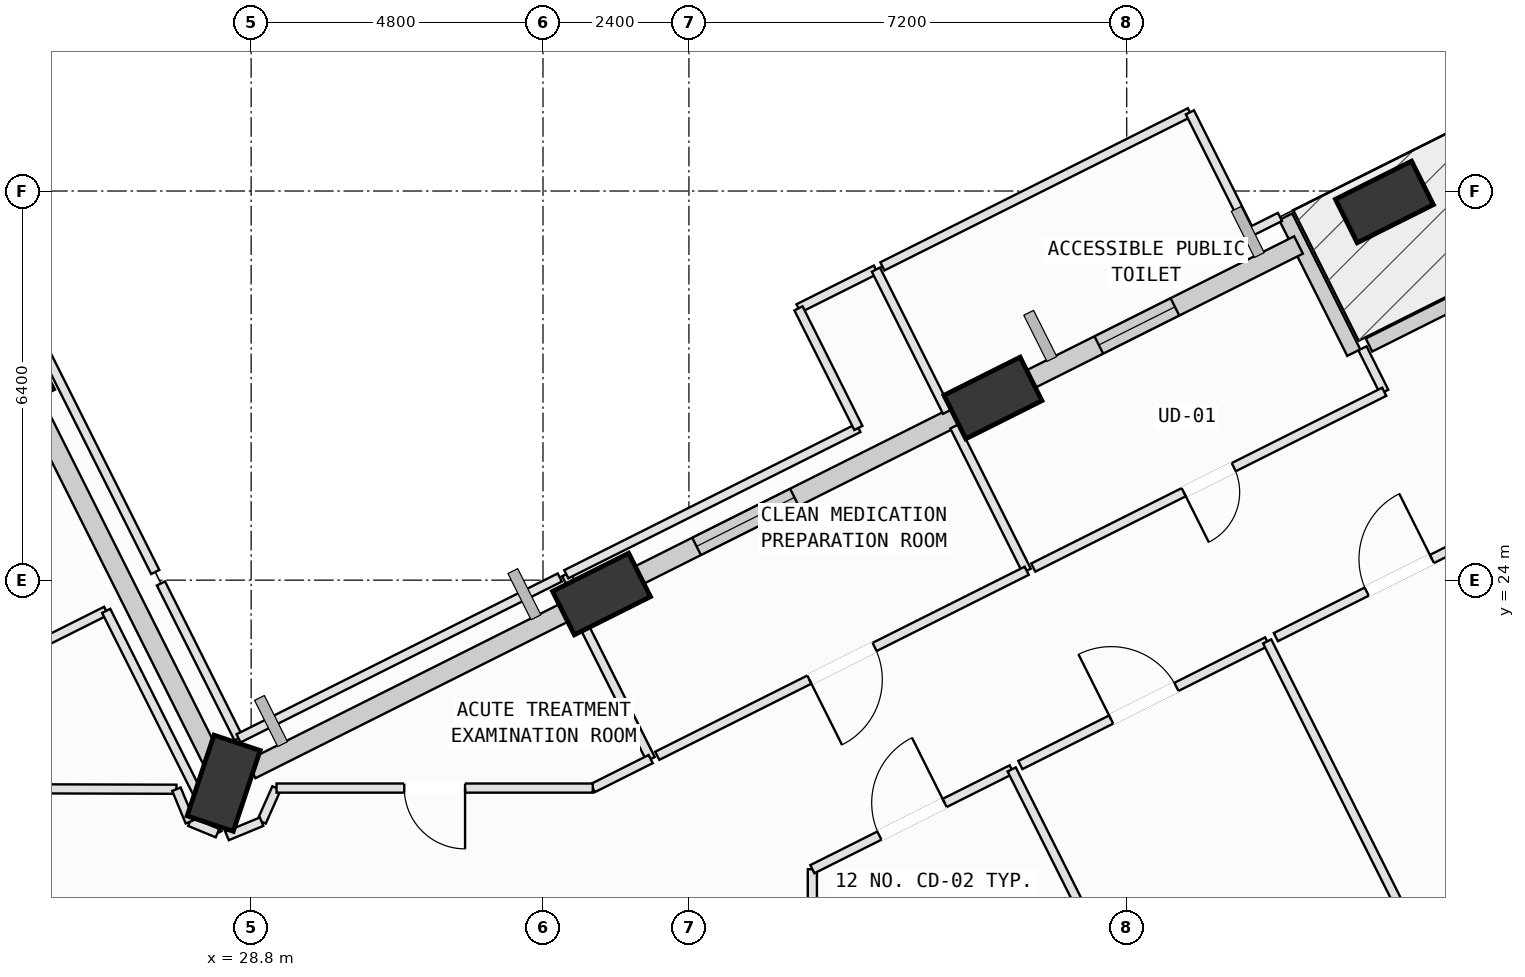
"""IFC4 building model, lengths in metres.
Left out: names, types, materials, properties, quantities, classifications, styles, units other than length and angle.
Written with IfcOpenShell. Run it as: python <this file> out.ifc"""

import sys

from ifc_helpers import new_model, si_unit, direction, frame, frame_2d, origin, origin_2d, place, context, subcontext, project, spatial, rectangle, extrude, element, fill, save


model = new_model("IFC4")
c1 = context("Model", 3, precision=1e-05, world=origin(), true_north=direction((0.0, 1.0)))
c2 = subcontext(c1, "Body", "Model", "MODEL_VIEW")
j1 = project(units=[si_unit("LENGTHUNIT", "METRE"), si_unit("PLANEANGLEUNIT", "RADIAN")], contexts=[c1])
p1 = place(None, origin())
s1 = spatial("IfcSite", under=j1, at=p1, CompositionType="ELEMENT")
p2 = place(p1, origin())
s2 = spatial("IfcBuilding", under=s1, at=p2, CompositionType="ELEMENT")
p3 = place(p2, frame((0.0, 0.0, 136.4)))
s3 = spatial("IfcBuildingStorey", under=s2, at=p3, CompositionType="ELEMENT", Elevation=136.4)
p4 = place(p3, frame((47.438, 30.22, 0.002), z_axis=(-0.022926759668, 0.057072997472, 0.998106726082), x_axis=(-0.663121749052, -0.748004750264, 0.027539780598)))
e1 = element("IfcColumn", 1, at=p4, inside=s3, PredefinedType="COLUMN", context=c2, shape_type="SweptSolid", body=[
    extrude(rectangle(XDim=1.4, YDim=0.8, at=origin_2d()), origin(), (0.0, 0.0, 1.0), 4.004),
])
p5 = place(p3, frame((41.0, 26.996, 0.002), z_axis=(-0.00934215371, 0.030590973914, 0.999488327335), x_axis=(-0.724454110909, -0.689174234147, 0.014321877472)))
e2 = element("IfcColumn", 2, at=p5, inside=s3, PredefinedType="COLUMN", context=c2, shape_type="SweptSolid", body=[
    extrude(rectangle(XDim=1.4, YDim=0.8, at=origin_2d()), origin(), (0.0, 0.0, 1.0), 3.998),
])
p6 = place(p3, frame((34.562, 23.772, 0.002), z_axis=(0.004215213278, 0.004031943135, 0.999982987561), x_axis=(-0.941623611576, 0.336657322205, 0.002611805604)))
e3 = element("IfcColumn", 3, at=p6, inside=s3, PredefinedType="COLUMN", context=c2, shape_type="SweptSolid", body=[
    extrude(rectangle(XDim=1.4, YDim=0.8, at=origin_2d()), origin(), (0.0, 0.0, 1.0), 3.996),
])
p7 = place(p3, frame((28.348, 20.66, 0.002), z_axis=(0.017282154619, -0.021617960194, 0.99961692209), x_axis=(-0.345727391393, 0.93796742084, 0.026261916961)))
e4 = element("IfcColumn", 4, at=p7, inside=s3, PredefinedType="COLUMN", context=c2, shape_type="SweptSolid", body=[
    extrude(rectangle(XDim=1.4, YDim=0.8, at=origin_2d()), origin(), (0.0, 0.0, 1.0), 3.998),
])
p8 = place(p3, frame((47.185, 27.867, 0.0), z_axis=(0.0, 0.0, 1.0), x_axis=(0.894146388343, 0.447774760581, 0.0)))
e5 = element("IfcWall", 5, at=p8, inside=s3, PredefinedType="SOLIDWALL", context=c2, shape_type="SweptSolid", body=[
    extrude(rectangle(XDim=6.96, YDim=0.24, at=frame_2d((3.48, 0.0))), origin(), (0.0, 0.0, 1.0), 2.945),
])
p9 = place(p8, frame((2.93, 0.0, 0.0)))
e6 = element("IfcOpeningElement", 6, at=p9, cuts=e5, PredefinedType="OPENING", context=c2, shape_type="SweptSolid", body=[
    extrude(rectangle(XDim=1.1, YDim=2.15, at=frame_2d((0.55, 1.075))), frame((0.0, 0.13, 0.0), z_axis=(0.0, -1.0, 0.0), x_axis=(1.0, 0.0, 0.0)), (0.0, 0.0, 1.0), 0.26),
])
p10 = place(p3, frame((45.815, 29.977, 0.0), z_axis=(0.0, 0.0, 1.0), x_axis=(0.447760394829, -0.894153582346, 0.0)))
e7 = element("IfcWall", 7, at=p10, inside=s3, PredefinedType="SOLIDWALL", context=c2, shape_type="SweptSolid", body=[
    extrude(rectangle(XDim=2.5, YDim=0.24, at=frame_2d((1.25, 0.0))), origin(), (0.0, 0.0, 1.0), 3.165),
])
p11 = place(p3, frame((41.45, 27.221, 0.0), z_axis=(0.0, 0.0, 1.0), x_axis=(0.894150296452, 0.447766956523, 0.0)))
e8 = element("IfcWall", 8, at=p11, inside=s3, PredefinedType="SOLIDWALL", context=c2, shape_type="SweptSolid", body=[
    extrude(rectangle(XDim=5.117, YDim=0.32, at=frame_2d((2.559, 0.0))), origin(), (0.0, 0.0, 1.0), 3.145),
])
p12 = place(p11, frame((1.445, 0.0, 0.75)))
e9 = element("IfcOpeningElement", 9, at=p12, cuts=e8, PredefinedType="OPENING", context=c2, shape_type="SweptSolid", body=[
    extrude(rectangle(XDim=1.4, YDim=1.85, at=frame_2d((0.7, 0.925))), frame((0.0, 0.17, 0.0), z_axis=(0.0, -1.0, 0.0), x_axis=(1.0, 0.0, 0.0)), (0.0, 0.0, 1.0), 0.34),
])
p13 = place(p3, frame((35.016, 23.999, 0.0), z_axis=(0.0, 0.0, 1.0), x_axis=(0.89415974242, 0.447748093279, 0.0)))
e10 = element("IfcWall", 10, at=p13, inside=s3, PredefinedType="SOLIDWALL", context=c2, shape_type="SweptSolid", body=[
    extrude(rectangle(XDim=6.211, YDim=0.32, at=frame_2d((3.105, 0.0))), origin(), (0.0, 0.0, 1.0), 3.165),
])
p14 = place(p13, frame((1.241, 0.0, 0.75)))
e11 = element("IfcOpeningElement", 11, at=p14, cuts=e10, PredefinedType="OPENING", context=c2, shape_type="SweptSolid", body=[
    extrude(rectangle(XDim=1.8, YDim=2.05, at=frame_2d((0.9, 1.025))), frame((0.0, 0.17, 0.0), z_axis=(0.0, -1.0, 0.0), x_axis=(1.0, 0.0, 0.0)), (0.0, 0.0, 1.0), 0.34),
])
p15 = place(p3, frame((28.799, 20.886, 0.0), z_axis=(0.0, 0.0, 1.0), x_axis=(0.894148466578, 0.447770610599, 0.0)))
e12 = element("IfcWall", 12, at=p15, inside=s3, PredefinedType="SOLIDWALL", context=c2, shape_type="SweptSolid", body=[
    extrude(rectangle(XDim=5.96, YDim=0.32, at=frame_2d((2.98, 0.0))), origin(), (0.0, 0.0, 1.0), 2.965),
])
p16 = place(p3, frame((25.123, 27.1, 0.0), z_axis=(0.0, 0.0, 1.0), x_axis=(0.447762469935, -0.894152543204, 0.0)))
e13 = element("IfcWall", 13, at=p16, inside=s3, PredefinedType="SOLIDWALL", context=c2, shape_type="SweptSolid", body=[
    extrude(rectangle(XDim=6.76, YDim=0.32, at=frame_2d((3.38, 0.0))), origin(), (0.0, 0.0, 1.0), 3.165),
])
p17 = place(p3, frame((38.03, 17.215, 0.0), z_axis=(0.0, 0.0, 1.0), x_axis=(0.0, 1.0, 0.0)))
e14 = element("IfcWall", 14, at=p17, inside=s3, PredefinedType="PARTITIONING", context=c2, shape_type="SweptSolid", body=[
    extrude(rectangle(XDim=2.031, YDim=0.15, at=frame_2d((1.016, 0.0))), origin(), (0.0, 0.0, 1.0), 3.78),
])
p18 = place(p3, frame((38.03, 19.246, 0.0), z_axis=(0.0, 0.0, 1.0), x_axis=(0.894227304173, 0.447613146, 0.0)))
e15 = element("IfcWall", 15, at=p18, inside=s3, PredefinedType="PARTITIONING", context=c2, shape_type="SweptSolid", body=[
    extrude(rectangle(XDim=3.666, YDim=0.15, at=frame_2d((1.833, 0.0))), origin(), (0.0, 0.0, 1.0), 2.945),
])
p19 = place(p18, frame((1.233, 0.0, 0.0)))
e16 = element("IfcOpeningElement", 16, at=p19, cuts=e15, PredefinedType="OPENING", context=c2, shape_type="SweptSolid", body=[
    extrude(rectangle(XDim=1.2, YDim=2.15, at=frame_2d((0.6, 1.075))), frame((0.0, 0.085, 0.0), z_axis=(0.0, -1.0, 0.0), x_axis=(1.0, 0.0, 0.0)), (0.0, 0.0, 1.0), 0.17),
])
p20 = place(p3, frame((41.308, 20.887, 0.0), z_axis=(0.0, 0.0, 1.0), x_axis=(0.447793043956, -0.894137232076, 0.0)))
e17 = element("IfcWall", 17, at=p20, inside=s3, PredefinedType="PARTITIONING", context=c2, shape_type="SweptSolid", body=[
    extrude(rectangle(XDim=15.166, YDim=0.15, at=frame_2d((7.583, 0.0))), origin(), (0.0, 0.0, 1.0), 3.78),
])
p21 = place(p3, frame((41.451, 20.959, 0.0), z_axis=(0.0, 0.0, 1.0), x_axis=(0.894125827082, 0.447815816319, 0.0)))
e18 = element("IfcWall", 18, at=p21, inside=s3, PredefinedType="PARTITIONING", context=c2, shape_type="SweptSolid", body=[
    extrude(rectangle(XDim=4.54, YDim=0.15, at=frame_2d((2.27, 0.0))), origin(), (0.0, 0.0, 1.0), 3.78),
])
p22 = place(p21, frame((1.67, 0.0, 0.0)))
e19 = element("IfcOpeningElement", 19, at=p22, cuts=e18, PredefinedType="OPENING", context=c2, shape_type="SweptSolid", body=[
    extrude(rectangle(XDim=1.2, YDim=2.15, at=frame_2d((0.6, 1.075))), frame((0.0, 0.085, 0.0), z_axis=(0.0, -1.0, 0.0), x_axis=(1.0, 0.0, 0.0)), (0.0, 0.0, 1.0), 0.17),
])
p23 = place(p3, frame((45.51, 22.992, 0.0), z_axis=(0.0, 0.0, 1.0), x_axis=(0.447741560251, -0.894163013787, 0.0)))
e20 = element("IfcWall", 20, at=p23, inside=s3, PredefinedType="PARTITIONING", context=c2, shape_type="SweptSolid", body=[
    extrude(rectangle(XDim=15.165, YDim=0.15, at=frame_2d((7.583, 0.0))), origin(), (0.0, 0.0, 1.0), 3.365),
])
p24 = place(p3, frame((45.653, 23.063, 0.0), z_axis=(0.0, 0.0, 1.0), x_axis=(0.894158174305, 0.447751224815, 0.0)))
e21 = element("IfcWall", 21, at=p24, inside=s3, PredefinedType="PARTITIONING", context=c2, shape_type="SweptSolid", body=[
    extrude(rectangle(XDim=4.54, YDim=0.15, at=frame_2d((2.27, 0.0))), origin(), (0.0, 0.0, 1.0), 3.78),
])
p25 = place(p24, frame((1.67, 0.0, 0.0)))
e22 = element("IfcOpeningElement", 22, at=p25, cuts=e21, PredefinedType="OPENING", context=c2, shape_type="SweptSolid", body=[
    extrude(rectangle(XDim=1.2, YDim=2.15, at=frame_2d((0.6, 1.075))), frame((0.0, 0.085, 0.0), z_axis=(0.0, -1.0, 0.0), x_axis=(1.0, 0.0, 0.0)), (0.0, 0.0, 1.0), 0.17),
])
p26 = place(p3, frame((27.572, 20.561, 0.0), z_axis=(0.0, 0.0, 1.0), x_axis=(-0.999996180723, 0.002763790734, 0.0)))
e23 = element("IfcWall", 23, at=p26, inside=s3, PredefinedType="PARTITIONING", context=c2, shape_type="SweptSolid", body=[
    extrude(rectangle(XDim=6.89, YDim=0.15, at=frame_2d((3.445, 0.0))), origin(), (0.0, 0.0, 1.0), 3.78),
])
p27 = place(p26, frame((2.945, 0.0, 0.0)))
e24 = element("IfcOpeningElement", 24, at=p27, cuts=e23, PredefinedType="OPENING", context=c2, shape_type="SweptSolid", body=[
    extrude(rectangle(XDim=1.0, YDim=2.12, at=frame_2d((0.5, 1.06))), frame((0.0, 0.085, 0.0), z_axis=(0.0, -1.0, 0.0), x_axis=(1.0, 0.0, 0.0)), (0.0, 0.0, 1.0), 0.17),
])
p28 = place(p3, frame((20.665, 20.615, 0.0), z_axis=(0.0, 0.0, 1.0), x_axis=(0.894138524152, 0.447790463976, 0.0)))
e25 = element("IfcWall", 25, at=p28, inside=s3, PredefinedType="PARTITIONING", context=c2, shape_type="SweptSolid", body=[
    extrude(rectangle(XDim=6.432, YDim=0.15, at=frame_2d((3.216, 0.0))), origin(), (0.0, 0.0, 1.0), 3.78),
])
p29 = place(p3, frame((26.416, 23.495, 0.0), z_axis=(0.0, 0.0, 1.0), x_axis=(0.447810576622, -0.894128451323, 0.0)))
e26 = element("IfcWall", 26, at=p29, inside=s3, PredefinedType="PARTITIONING", context=c2, shape_type="SweptSolid", body=[
    extrude(rectangle(XDim=4.089, YDim=0.15, at=frame_2d((2.044, 0.0))), origin(), (0.0, 0.0, 1.0), 3.165),
])
p30 = place(p3, frame((28.247, 19.839, 0.0), z_axis=(0.0, 0.0, 1.0), x_axis=(-0.923956302996, 0.382498039412, 0.0)))
e27 = element("IfcWall", 27, at=p30, inside=s3, PredefinedType="PARTITIONING", context=c2, shape_type="SweptSolid", body=[
    extrude(rectangle(XDim=0.491, YDim=0.15, at=frame_2d((0.246, 0.0))), origin(), (0.0, 0.0, 1.0), 3.78),
])
p31 = place(p3, frame((27.793, 20.027, 0.0), z_axis=(0.0, 0.0, 1.0), x_axis=(-0.382364231834, 0.924011685107, 0.0)))
e28 = element("IfcWall", 28, at=p31, inside=s3, PredefinedType="PARTITIONING", context=c2, shape_type="SweptSolid", body=[
    extrude(rectangle(XDim=0.578, YDim=0.15, at=frame_2d((0.289, 0.0))), origin(), (0.0, 0.0, 1.0), 3.78),
])
p32 = place(p3, frame((29.218, 20.58, 0.0), z_axis=(0.0, 0.0, 1.0), x_axis=(-0.406587519567, -0.913611837123, 0.0)))
e29 = element("IfcWall", 29, at=p32, inside=s3, PredefinedType="PARTITIONING", context=c2, shape_type="SweptSolid", body=[
    extrude(rectangle(XDim=0.605, YDim=0.15, at=frame_2d((0.303, 0.0))), origin(), (0.0, 0.0, 1.0), 3.78),
])
p33 = place(p3, frame((28.972, 20.027, 0.0), z_axis=(0.0, 0.0, 1.0), x_axis=(-0.923944226518, -0.382527209861, 0.0)))
e30 = element("IfcWall", 30, at=p33, inside=s3, PredefinedType="PARTITIONING", context=c2, shape_type="SweptSolid", body=[
    extrude(rectangle(XDim=0.615, YDim=0.15, at=frame_2d((0.307, 0.0))), origin(), (0.0, 0.0, 1.0), 3.78),
])
p34 = place(p3, frame((27.317, 23.946, 0.0), z_axis=(0.0, 0.0, 1.0), x_axis=(0.447796055297, -0.894135723959, 0.0)))
e31 = element("IfcWall", 31, at=p34, inside=s3, PredefinedType="PARTITIONING", context=c2, shape_type="SweptSolid", body=[
    extrude(rectangle(XDim=2.85, YDim=0.15, at=frame_2d((1.425, 0.0))), origin(), (0.0, 0.0, 1.0), 3.78),
])
p35 = place(p3, frame((28.593, 21.398, 0.0), z_axis=(0.0, 0.0, 1.0), x_axis=(0.894187389423, 0.447692877536, 0.0)))
e32 = element("IfcWall", 32, at=p35, inside=s3, PredefinedType="PARTITIONING", context=c2, shape_type="SweptSolid", body=[
    extrude(rectangle(XDim=5.908, YDim=0.15, at=frame_2d((2.954, 0.0))), origin(), (0.0, 0.0, 1.0), 3.78),
])
p36 = place(p3, frame((34.182, 23.431, 0.0), z_axis=(0.0, 0.0, 1.0), x_axis=(0.447875493848, -0.894095935574, 0.0)))
e33 = element("IfcWall", 33, at=p36, inside=s3, PredefinedType="PARTITIONING", context=c2, shape_type="SweptSolid", body=[
    extrude(rectangle(XDim=2.655, YDim=0.15, at=frame_2d((1.328, 0.0))), origin(), (0.0, 0.0, 1.0), 2.965),
])
p37 = place(p3, frame((35.371, 21.057, 0.0), z_axis=(0.0, 0.0, 1.0), x_axis=(-0.894151898084, -0.447763758194, 0.0)))
e34 = element("IfcWall", 34, at=p37, inside=s3, PredefinedType="PARTITIONING", context=c2, shape_type="SweptSolid", body=[
    extrude(rectangle(XDim=1.065, YDim=0.15, at=frame_2d((0.532, 0.0))), origin(), (0.0, 0.0, 1.0), 3.365),
])
p38 = place(p3, frame((34.419, 20.58, 0.0), z_axis=(0.0, 0.0, 1.0), x_axis=(-1.0, 0.0, 0.0)))
e35 = element("IfcWall", 35, at=p38, inside=s3, PredefinedType="PARTITIONING", context=c2, shape_type="SweptSolid", body=[
    extrude(rectangle(XDim=5.201, YDim=0.15, at=frame_2d((2.601, 0.0))), origin(), (0.0, 0.0, 1.0), 3.365),
])
p39 = place(p38, frame((2.101, 0.0, 0.0)))
e36 = element("IfcOpeningElement", 36, at=p39, cuts=e35, PredefinedType="OPENING", context=c2, shape_type="SweptSolid", body=[
    extrude(rectangle(XDim=1.0, YDim=2.12, at=frame_2d((0.5, 1.06))), frame((0.0, 0.085, 0.0), z_axis=(0.0, -1.0, 0.0), x_axis=(1.0, 0.0, 0.0)), (0.0, 0.0, 1.0), 0.17),
])
p40 = place(p3, frame((37.802, 28.47, 0.0), z_axis=(0.0, 0.0, 1.0), x_axis=(0.894289935255, 0.447488001741, 0.0)))
e37 = element("IfcWall", 37, at=p40, inside=s3, PredefinedType="PARTITIONING", context=c2, shape_type="SweptSolid", body=[
    extrude(rectangle(XDim=1.423, YDim=0.15, at=frame_2d((0.712, 0.0))), origin(), (0.0, 0.0, 1.0), 3.78),
])
p41 = place(p3, frame((39.075, 29.107, 0.0), z_axis=(0.0, 0.0, 1.0), x_axis=(0.447885717917, -0.894090814004, 0.0)))
e38 = element("IfcWall", 38, at=p41, inside=s3, PredefinedType="PARTITIONING", context=c2, shape_type="SweptSolid", body=[
    extrude(rectangle(XDim=2.615, YDim=0.15, at=frame_2d((1.307, 0.0))), origin(), (0.0, 0.0, 1.0), 3.78),
])
p42 = place(p3, frame((40.366, 26.528, 0.0), z_axis=(0.0, 0.0, 1.0), x_axis=(0.447801985911, -0.894132753798, 0.0)))
e39 = element("IfcWall", 39, at=p42, inside=s3, PredefinedType="PARTITIONING", context=c2, shape_type="SweptSolid", body=[
    extrude(rectangle(XDim=2.655, YDim=0.15, at=frame_2d((1.328, 0.0))), origin(), (0.0, 0.0, 1.0), 3.78),
])
p43 = place(p3, frame((41.555, 24.154, 0.0), z_axis=(0.0, 0.0, 1.0), x_axis=(-0.894132389876, -0.447802712558, 0.0)))
e40 = element("IfcWall", 40, at=p43, inside=s3, PredefinedType="PARTITIONING", context=c2, shape_type="SweptSolid", body=[
    extrude(rectangle(XDim=6.795, YDim=0.15, at=frame_2d((3.398, 0.0))), origin(), (0.0, 0.0, 1.0), 3.78),
])
p44 = place(p43, frame((2.798, 0.0, 0.0)))
e41 = element("IfcOpeningElement", 41, at=p44, cuts=e40, PredefinedType="OPENING", context=c2, shape_type="SweptSolid", body=[
    extrude(rectangle(XDim=1.2, YDim=2.15, at=frame_2d((0.6, 1.075))), frame((0.0, 0.085, 0.0), z_axis=(0.0, -1.0, 0.0), x_axis=(1.0, 0.0, 0.0)), (0.0, 0.0, 1.0), 0.17),
])
p45 = place(p3, frame((34.196, 23.671, 0.0), z_axis=(0.0, 0.0, 1.0), x_axis=(-0.447418586542, 0.894324666112, 0.0)))
e42 = element("IfcWall", 42, at=p45, inside=s3, PredefinedType="PARTITIONING", context=c2, shape_type="SweptSolid", body=[
    extrude(rectangle(XDim=0.476, YDim=0.15, at=frame_2d((0.238, 0.0))), origin(), (0.0, 0.0, 1.0), 2.965),
])
p46 = place(p3, frame((33.983, 24.097, 0.0), z_axis=(0.0, 0.0, 1.0), x_axis=(0.894136196348, 0.447795112055, 0.0)))
e43 = element("IfcWall", 43, at=p46, inside=s3, PredefinedType="PARTITIONING", context=c2, shape_type="SweptSolid", body=[
    extrude(rectangle(XDim=5.373, YDim=0.15, at=frame_2d((2.687, 0.0))), origin(), (0.0, 0.0, 1.0), 3.78),
])
p47 = place(p3, frame((38.787, 26.503, 0.0), z_axis=(0.0, 0.0, 1.0), x_axis=(-0.447790580738, 0.894138465677, 0.0)))
e44 = element("IfcWall", 44, at=p47, inside=s3, PredefinedType="PARTITIONING", context=c2, shape_type="SweptSolid", body=[
    extrude(rectangle(XDim=2.2, YDim=0.15, at=frame_2d((1.1, 0.0))), origin(), (0.0, 0.0, 1.0), 3.78),
])
p48 = place(p3, frame((47.077, 27.813, 0.0), z_axis=(0.0, 0.0, 1.0), x_axis=(0.447824021677, -0.894121717446, 0.0)))
e45 = element("IfcWall", 45, at=p48, inside=s3, PredefinedType="PARTITIONING", context=c2, shape_type="SweptSolid", body=[
    extrude(rectangle(XDim=0.8, YDim=0.15, at=frame_2d((0.4, 0.0))), origin(), (0.0, 0.0, 1.0), 3.78),
])
p49 = place(p3, frame((47.435, 27.098, 0.0), z_axis=(0.0, 0.0, 1.0), x_axis=(-0.894124431729, -0.447818602322, 0.0)))
e46 = element("IfcWall", 46, at=p49, inside=s3, PredefinedType="PARTITIONING", context=c2, shape_type="SweptSolid", body=[
    extrude(rectangle(XDim=6.456, YDim=0.15, at=frame_2d((3.228, 0.0))), origin(), (0.0, 0.0, 1.0), 2.945),
])
p50 = place(p49, frame((2.768, 0.0, 0.0)))
e47 = element("IfcOpeningElement", 47, at=p50, cuts=e46, PredefinedType="OPENING", context=c2, shape_type="SweptSolid", body=[
    extrude(rectangle(XDim=0.92, YDim=2.1, at=frame_2d((0.46, 1.05))), frame((0.0, 0.085, 0.0), z_axis=(0.0, -1.0, 0.0), x_axis=(1.0, 0.0, 0.0)), (0.0, 0.0, 1.0), 0.17),
])
p51 = place(p3, frame((39.182, 29.161, 0.0), z_axis=(0.0, 0.0, 1.0), x_axis=(0.894098904037, 0.447869567843, 0.0)))
e48 = element("IfcWall", 48, at=p51, inside=s3, PredefinedType="PARTITIONING", context=c2, shape_type="SweptSolid", body=[
    extrude(rectangle(XDim=5.656, YDim=0.15, at=frame_2d((2.828, 0.0))), origin(), (0.0, 0.0, 1.0), 3.78),
])
p52 = place(p3, frame((44.239, 31.694, 0.0), z_axis=(0.0, 0.0, 1.0), x_axis=(0.447967628114, -0.894049777228, 0.0)))
e49 = element("IfcWall", 49, at=p52, inside=s3, PredefinedType="PARTITIONING", context=c2, shape_type="SweptSolid", body=[
    extrude(rectangle(XDim=2.201, YDim=0.15, at=frame_2d((1.101, 0.0))), origin(), (0.0, 0.0, 1.0), 3.78),
])
p53 = place(p3, frame((45.225, 29.726, 0.0), z_axis=(0.0, 0.0, 1.0), x_axis=(0.893985717216, 0.448095455694, 0.0)))
e50 = element("IfcWall", 50, at=p53, inside=s3, PredefinedType="PARTITIONING", context=c2, shape_type="SweptSolid", body=[
    extrude(rectangle(XDim=0.553, YDim=0.15, at=frame_2d((0.277, 0.0))), origin(), (0.0, 0.0, 1.0), 3.145),
])
p54 = place(p3, frame((24.331, 29.91, 0.0), z_axis=(0.0, 0.0, 1.0), x_axis=(0.447697322881, -0.894185163758, 0.0)))
e51 = element("IfcWall", 51, at=p54, inside=s3, PredefinedType="PARTITIONING", context=c2, shape_type="SweptSolid", body=[
    extrude(rectangle(XDim=6.459, YDim=0.15, at=frame_2d((3.23, 0.0))), origin(), (0.0, 0.0, 1.0), 3.78),
])
p55 = place(p12, origin())
e52 = element("IfcWindow", 52, at=p55, inside=s3, PartitioningType="SINGLE_PANEL", PredefinedType="WINDOW", context=c2, shape_type="SweptSolid", body=[
    extrude(rectangle(XDim=1.4, YDim=1.85, at=frame_2d((0.7, 0.925))), frame((0.0, 0.03, 0.0), z_axis=(0.0, -1.0, 0.0), x_axis=(1.0, 0.0, 0.0)), (0.0, 0.0, 1.0), 0.06),
])
fill(e9, e52)
p56 = place(p14, origin())
e53 = element("IfcWindow", 53, at=p56, inside=s3, PartitioningType="SINGLE_PANEL", PredefinedType="WINDOW", context=c2, shape_type="SweptSolid", body=[
    extrude(rectangle(XDim=1.8, YDim=2.05, at=frame_2d((0.9, 1.025))), frame((0.0, 0.03, 0.0), z_axis=(0.0, -1.0, 0.0), x_axis=(1.0, 0.0, 0.0)), (0.0, 0.0, 1.0), 0.06),
])
fill(e11, e53)
p57 = place(p19, origin())
e54 = element("IfcDoor", 54, at=p57, inside=s3, OperationType="SINGLE_SWING_RIGHT", PredefinedType="DOOR", context=c2, shape_type="SweptSolid", body=[
    extrude(rectangle(XDim=1.2, YDim=2.15, at=frame_2d((0.6, 1.075))), frame((0.0, 0.025, 0.0), z_axis=(0.0, -1.0, 0.0), x_axis=(1.0, 0.0, 0.0)), (0.0, 0.0, 1.0), 0.05),
])
fill(e16, e54)
p58 = place(p22, origin())
e55 = element("IfcDoor", 55, at=p58, inside=s3, OperationType="SINGLE_SWING_LEFT", PredefinedType="DOOR", context=c2, shape_type="SweptSolid", body=[
    extrude(rectangle(XDim=1.2, YDim=2.15, at=frame_2d((0.6, 1.075))), frame((0.0, 0.025, 0.0), z_axis=(0.0, -1.0, 0.0), x_axis=(1.0, 0.0, 0.0)), (0.0, 0.0, 1.0), 0.05),
])
fill(e19, e55)
p59 = place(p25, origin())
e56 = element("IfcDoor", 56, at=p59, inside=s3, OperationType="SINGLE_SWING_RIGHT", PredefinedType="DOOR", context=c2, shape_type="SweptSolid", body=[
    extrude(rectangle(XDim=1.2, YDim=2.15, at=frame_2d((0.6, 1.075))), frame((0.0, 0.025, 0.0), z_axis=(0.0, -1.0, 0.0), x_axis=(1.0, 0.0, 0.0)), (0.0, 0.0, 1.0), 0.05),
])
fill(e22, e56)
p60 = place(p39, origin())
e57 = element("IfcDoor", 57, at=p60, inside=s3, OperationType="SINGLE_SWING_LEFT", PredefinedType="DOOR", context=c2, shape_type="SweptSolid", body=[
    extrude(rectangle(XDim=1.0, YDim=2.12, at=frame_2d((0.5, 1.06))), frame((0.0, 0.025, 0.0), z_axis=(0.0, -1.0, 0.0), x_axis=(1.0, 0.0, 0.0)), (0.0, 0.0, 1.0), 0.05),
])
fill(e36, e57)
p61 = place(p44, origin())
e58 = element("IfcDoor", 58, at=p61, inside=s3, OperationType="SINGLE_SWING_RIGHT", PredefinedType="DOOR", context=c2, shape_type="SweptSolid", body=[
    extrude(rectangle(XDim=1.2, YDim=2.15, at=frame_2d((0.6, 1.075))), frame((0.0, 0.025, 0.0), z_axis=(0.0, -1.0, 0.0), x_axis=(1.0, 0.0, 0.0)), (0.0, 0.0, 1.0), 0.05),
])
fill(e41, e58)
p62 = place(p50, origin())
e59 = element("IfcDoor", 59, at=p62, inside=s3, OperationType="SINGLE_SWING_RIGHT", PredefinedType="DOOR", context=c2, shape_type="SweptSolid", body=[
    extrude(rectangle(XDim=0.92, YDim=2.1, at=frame_2d((0.46, 1.05))), frame((0.0, 0.025, 0.0), z_axis=(0.0, -1.0, 0.0), x_axis=(1.0, 0.0, 0.0)), (0.0, 0.0, 1.0), 0.05),
])
fill(e47, e59)
save(model, sys.argv[1])
